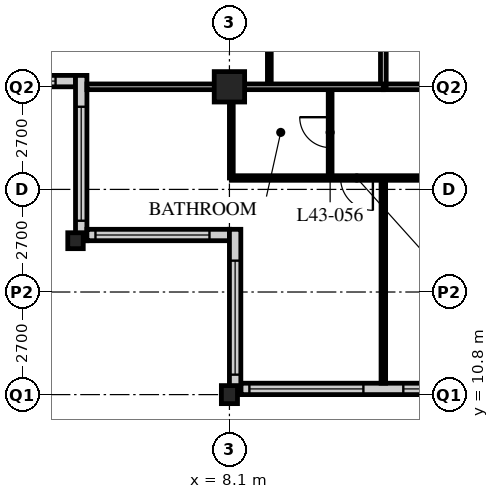
"""IFC4 building model, lengths in metres.
Left out: names, types, materials, properties, quantities, classifications, styles, units other than length and angle.
Written with IfcOpenShell. Run it as: python <this file> out.ifc"""

import sys

from ifc_helpers import new_model, si_unit, direction, frame, frame_2d, origin, origin_2d, place, context, subcontext, project, spatial, rectangle, hollow_rectangle, i_section, extrude, element, fill, save


model = new_model("IFC4")
c1 = context("Model", 3, precision=1e-05, world=origin(), true_north=direction((0.0, 1.0)))
c2 = subcontext(c1, "Body", "Model", "MODEL_VIEW")
j1 = project(units=[si_unit("LENGTHUNIT", "METRE"), si_unit("PLANEANGLEUNIT", "RADIAN")], contexts=[c1])
p1 = place(None, origin())
s1 = spatial("IfcSite", under=j1, at=p1, CompositionType="ELEMENT")
p2 = place(p1, origin())
s2 = spatial("IfcBuilding", under=s1, at=p2, CompositionType="ELEMENT")
p3 = place(p2, frame((0.0, 0.0, 170.4)))
s3 = spatial("IfcBuildingStorey", under=s2, at=p3, CompositionType="ELEMENT", Elevation=170.4)
p4 = place(p3, frame((4.05, 14.85, 0.0), z_axis=(0.0, 0.0, 1.0), x_axis=(1.0, 0.0, 0.0)))
e1 = element("IfcColumn", 1, at=p4, inside=s3, PredefinedType="COLUMN", context=c2, shape_type="SweptSolid", body=[
    extrude(i_section(OverallWidth=0.407, OverallDepth=0.419, WebThickness=0.031, FlangeThickness=0.049, FilletRadius=0.015, at=origin_2d()), origin(), (0.0, 0.0, 1.0), 3.6),
])
p5 = place(p3, frame((8.1, 10.8, 0.0), z_axis=(0.0, 0.0, 1.0), x_axis=(1.0, 0.0, 0.0)))
e2 = element("IfcColumn", 2, at=p5, inside=s3, PredefinedType="COLUMN", context=c2, shape_type="SweptSolid", body=[
    extrude(i_section(OverallWidth=0.424, OverallDepth=0.475, WebThickness=0.048, FlangeThickness=0.077, FilletRadius=0.015, at=origin_2d()), origin(), (0.0, 0.0, 1.0), 3.6),
])
p6 = place(p3, frame((8.1, 18.9, 0.0), z_axis=(0.0, 0.0, 1.0), x_axis=(1.0, 0.0, 0.0)))
e3 = element("IfcColumn", 3, at=p6, inside=s3, PredefinedType="COLUMN", context=c2, shape_type="SweptSolid", body=[
    extrude(hollow_rectangle(XDim=0.8, YDim=0.8, WallThickness=0.08, at=origin_2d()), origin(), (0.0, 0.0, 1.0), 3.6),
])
p7 = place(p3, frame((8.4, 10.95, 0.0), z_axis=(0.0, 0.0, 1.0), x_axis=(1.0, 0.0, 0.0)))
e4 = element("IfcWall", 4, at=p7, inside=s3, PredefinedType="SOLIDWALL", context=c2, shape_type="SweptSolid", body=[
    extrude(rectangle(XDim=40.2, YDim=0.3, at=frame_2d((20.1, 0.0))), origin(), (0.0, 0.0, 1.0), 3.39),
])
p8 = place(p7, frame((0.225, 0.0, 0.6)))
e5 = element("IfcOpeningElement", 5, at=p8, cuts=e4, PredefinedType="OPENING", context=c2, shape_type="SweptSolid", body=[
    extrude(rectangle(XDim=3.0, YDim=2.4, at=frame_2d((1.5, 1.2))), frame((0.0, 0.16, 0.0), z_axis=(0.0, -1.0, 0.0), x_axis=(1.0, 0.0, 0.0)), (0.0, 0.0, 1.0), 0.32),
])
p9 = place(p7, frame((4.275, 0.0, 0.6)))
e6 = element("IfcOpeningElement", 6, at=p9, cuts=e4, PredefinedType="OPENING", context=c2, shape_type="SweptSolid", body=[
    extrude(rectangle(XDim=3.0, YDim=2.4, at=frame_2d((1.5, 1.2))), frame((0.0, 0.16, 0.0), z_axis=(0.0, -1.0, 0.0), x_axis=(1.0, 0.0, 0.0)), (0.0, 0.0, 1.0), 0.32),
])
p10 = place(p7, frame((8.325, 0.0, 0.6)))
e7 = element("IfcOpeningElement", 7, at=p10, cuts=e4, PredefinedType="OPENING", context=c2, shape_type="SweptSolid", body=[
    extrude(rectangle(XDim=3.0, YDim=2.4, at=frame_2d((1.5, 1.2))), frame((0.0, 0.16, 0.0), z_axis=(0.0, -1.0, 0.0), x_axis=(1.0, 0.0, 0.0)), (0.0, 0.0, 1.0), 0.32),
])
p11 = place(p7, frame((12.375, 0.0, 0.6)))
e8 = element("IfcOpeningElement", 8, at=p11, cuts=e4, PredefinedType="OPENING", context=c2, shape_type="SweptSolid", body=[
    extrude(rectangle(XDim=3.0, YDim=2.4, at=frame_2d((1.5, 1.2))), frame((0.0, 0.16, 0.0), z_axis=(0.0, -1.0, 0.0), x_axis=(1.0, 0.0, 0.0)), (0.0, 0.0, 1.0), 0.32),
])
p12 = place(p7, frame((16.425, 0.0, 0.6)))
e9 = element("IfcOpeningElement", 9, at=p12, cuts=e4, PredefinedType="OPENING", context=c2, shape_type="SweptSolid", body=[
    extrude(rectangle(XDim=3.0, YDim=2.4, at=frame_2d((1.5, 1.2))), frame((0.0, 0.16, 0.0), z_axis=(0.0, -1.0, 0.0), x_axis=(1.0, 0.0, 0.0)), (0.0, 0.0, 1.0), 0.32),
])
p13 = place(p7, frame((20.475, 0.0, 0.6)))
e10 = element("IfcOpeningElement", 10, at=p13, cuts=e4, PredefinedType="OPENING", context=c2, shape_type="SweptSolid", body=[
    extrude(rectangle(XDim=3.0, YDim=2.4, at=frame_2d((1.5, 1.2))), frame((0.0, 0.16, 0.0), z_axis=(0.0, -1.0, 0.0), x_axis=(1.0, 0.0, 0.0)), (0.0, 0.0, 1.0), 0.32),
])
p14 = place(p7, frame((24.525, 0.0, 0.6)))
e11 = element("IfcOpeningElement", 11, at=p14, cuts=e4, PredefinedType="OPENING", context=c2, shape_type="SweptSolid", body=[
    extrude(rectangle(XDim=3.0, YDim=2.4, at=frame_2d((1.5, 1.2))), frame((0.0, 0.16, 0.0), z_axis=(0.0, -1.0, 0.0), x_axis=(1.0, 0.0, 0.0)), (0.0, 0.0, 1.0), 0.32),
])
p15 = place(p7, frame((28.575, 0.0, 0.6)))
e12 = element("IfcOpeningElement", 12, at=p15, cuts=e4, PredefinedType="OPENING", context=c2, shape_type="SweptSolid", body=[
    extrude(rectangle(XDim=3.0, YDim=2.4, at=frame_2d((1.5, 1.2))), frame((0.0, 0.16, 0.0), z_axis=(0.0, -1.0, 0.0), x_axis=(1.0, 0.0, 0.0)), (0.0, 0.0, 1.0), 0.32),
])
p16 = place(p7, frame((32.625, 0.0, 0.6)))
e13 = element("IfcOpeningElement", 13, at=p16, cuts=e4, PredefinedType="OPENING", context=c2, shape_type="SweptSolid", body=[
    extrude(rectangle(XDim=3.0, YDim=2.4, at=frame_2d((1.5, 1.2))), frame((0.0, 0.16, 0.0), z_axis=(0.0, -1.0, 0.0), x_axis=(1.0, 0.0, 0.0)), (0.0, 0.0, 1.0), 0.32),
])
p17 = place(p7, frame((36.675, 0.0, 0.6)))
e14 = element("IfcOpeningElement", 14, at=p17, cuts=e4, PredefinedType="OPENING", context=c2, shape_type="SweptSolid", body=[
    extrude(rectangle(XDim=3.0, YDim=2.4, at=frame_2d((1.5, 1.2))), frame((0.0, 0.16, 0.0), z_axis=(0.0, -1.0, 0.0), x_axis=(1.0, 0.0, 0.0)), (0.0, 0.0, 1.0), 0.32),
])
p18 = place(p3, frame((0.3, 19.05, 0.0), z_axis=(0.0, 0.0, 1.0), x_axis=(1.0, 0.0, 0.0)))
e15 = element("IfcWall", 15, at=p18, inside=s3, PredefinedType="SOLIDWALL", context=c2, shape_type="SweptSolid", body=[
    extrude(rectangle(XDim=3.75, YDim=0.3, at=frame_2d((1.875, 0.0))), origin(), (0.0, 0.0, 1.0), 3.39),
])
p19 = place(p18, frame((0.225, 0.0, 0.6)))
e16 = element("IfcOpeningElement", 16, at=p19, cuts=e15, PredefinedType="OPENING", context=c2, shape_type="SweptSolid", body=[
    extrude(rectangle(XDim=3.0, YDim=2.0, at=frame_2d((1.5, 1.0))), frame((0.0, 0.16, 0.0), z_axis=(0.0, -1.0, 0.0), x_axis=(1.0, 0.0, 0.0)), (0.0, 0.0, 1.0), 0.32),
])
p20 = place(p3, frame((4.2, 19.2, 0.0), z_axis=(0.0, 0.0, 1.0), x_axis=(0.0, -1.0, 0.0)))
e17 = element("IfcWall", 17, at=p20, inside=s3, PredefinedType="SOLIDWALL", context=c2, shape_type="SweptSolid", body=[
    extrude(rectangle(XDim=4.35, YDim=0.3, at=frame_2d((2.175, 0.0))), origin(), (0.0, 0.0, 1.0), 3.39),
])
p21 = place(p20, frame((0.825, 0.0, 0.6)))
e18 = element("IfcOpeningElement", 18, at=p21, cuts=e17, PredefinedType="OPENING", context=c2, shape_type="SweptSolid", body=[
    extrude(rectangle(XDim=3.0, YDim=2.0, at=frame_2d((1.5, 1.0))), frame((0.0, 0.16, 0.0), z_axis=(0.0, -1.0, 0.0), x_axis=(1.0, 0.0, 0.0)), (0.0, 0.0, 1.0), 0.32),
])
p22 = place(p3, frame((4.35, 15.0, 0.0), z_axis=(0.0, 0.0, 1.0), x_axis=(1.0, 0.0, 0.0)))
e19 = element("IfcWall", 19, at=p22, inside=s3, PredefinedType="SOLIDWALL", context=c2, shape_type="SweptSolid", body=[
    extrude(rectangle(XDim=3.75, YDim=0.3, at=frame_2d((1.875, 0.0))), origin(), (0.0, 0.0, 1.0), 3.39),
])
p23 = place(p22, frame((0.225, 0.0, 0.6)))
e20 = element("IfcOpeningElement", 20, at=p23, cuts=e19, PredefinedType="OPENING", context=c2, shape_type="SweptSolid", body=[
    extrude(rectangle(XDim=3.0, YDim=2.0, at=frame_2d((1.5, 1.0))), frame((0.0, 0.16, 0.0), z_axis=(0.0, -1.0, 0.0), x_axis=(1.0, 0.0, 0.0)), (0.0, 0.0, 1.0), 0.32),
])
p24 = place(p3, frame((8.25, 15.15, 0.0), z_axis=(0.0, 0.0, 1.0), x_axis=(0.0, -1.0, 0.0)))
e21 = element("IfcWall", 21, at=p24, inside=s3, PredefinedType="SOLIDWALL", context=c2, shape_type="SweptSolid", body=[
    extrude(rectangle(XDim=4.35, YDim=0.3, at=frame_2d((2.175, 0.0))), origin(), (0.0, 0.0, 1.0), 3.39),
])
p25 = place(p24, frame((0.825, 0.0, 0.6)))
e22 = element("IfcOpeningElement", 22, at=p25, cuts=e21, PredefinedType="OPENING", context=c2, shape_type="SweptSolid", body=[
    extrude(rectangle(XDim=3.0, YDim=2.0, at=frame_2d((1.5, 1.0))), frame((0.0, 0.16, 0.0), z_axis=(0.0, -1.0, 0.0), x_axis=(1.0, 0.0, 0.0)), (0.0, 0.0, 1.0), 0.32),
])
p26 = place(p3, frame((12.15, 18.9, 0.0), z_axis=(0.0, 0.0, 1.0), x_axis=(1.0, 0.0, 0.0)))
e23 = element("IfcWall", 23, at=p26, inside=s3, PredefinedType="PARTITIONING", context=c2, shape_type="SweptSolid", body=[
    extrude(rectangle(XDim=32.4, YDim=0.15, at=frame_2d((16.2, 0.0))), origin(), (0.0, 0.0, 1.0), 2.778),
])
p27 = place(p26, frame((6.4, 0.0, 0.0)))
e24 = element("IfcOpeningElement", 24, at=p27, cuts=e23, PredefinedType="OPENING", context=c2, shape_type="SweptSolid", body=[
    extrude(rectangle(XDim=1.0, YDim=2.1, at=frame_2d((0.5, 1.05))), frame((0.0, 0.085, 0.0), z_axis=(0.0, -1.0, 0.0), x_axis=(1.0, 0.0, 0.0)), (0.0, 0.0, 1.0), 0.17),
])
p28 = place(p26, frame((8.8, 0.0, 0.0)))
e25 = element("IfcOpeningElement", 25, at=p28, cuts=e23, PredefinedType="OPENING", context=c2, shape_type="SweptSolid", body=[
    extrude(rectangle(XDim=1.0, YDim=2.1, at=frame_2d((0.5, 1.05))), frame((0.0, 0.085, 0.0), z_axis=(0.0, -1.0, 0.0), x_axis=(1.0, 0.0, 0.0)), (0.0, 0.0, 1.0), 0.17),
])
p29 = place(p26, frame((13.05, 0.0, 0.0)))
e26 = element("IfcOpeningElement", 26, at=p29, cuts=e23, PredefinedType="OPENING", context=c2, shape_type="SweptSolid", body=[
    extrude(rectangle(XDim=1.0, YDim=2.1, at=frame_2d((0.5, 1.05))), frame((0.0, 0.085, 0.0), z_axis=(0.0, -1.0, 0.0), x_axis=(1.0, 0.0, 0.0)), (0.0, 0.0, 1.0), 0.17),
])
p30 = place(p26, frame((22.6, 0.0, 0.0)))
e27 = element("IfcOpeningElement", 27, at=p30, cuts=e23, PredefinedType="OPENING", context=c2, shape_type="SweptSolid", body=[
    extrude(rectangle(XDim=1.0, YDim=2.1, at=frame_2d((0.5, 1.05))), frame((0.0, 0.085, 0.0), z_axis=(0.0, -1.0, 0.0), x_axis=(1.0, 0.0, 0.0)), (0.0, 0.0, 1.0), 0.17),
])
p31 = place(p26, frame((25.0, 0.0, 0.0)))
e28 = element("IfcOpeningElement", 28, at=p31, cuts=e23, PredefinedType="OPENING", context=c2, shape_type="SweptSolid", body=[
    extrude(rectangle(XDim=1.0, YDim=2.1, at=frame_2d((0.5, 1.05))), frame((0.0, 0.085, 0.0), z_axis=(0.0, -1.0, 0.0), x_axis=(1.0, 0.0, 0.0)), (0.0, 0.0, 1.0), 0.17),
])
p32 = place(p26, frame((1.525, 0.0, 0.0)))
e29 = element("IfcOpeningElement", 29, at=p32, cuts=e23, PredefinedType="OPENING", context=c2, shape_type="SweptSolid", body=[
    extrude(rectangle(XDim=1.0, YDim=2.1, at=frame_2d((0.5, 1.05))), frame((0.0, 0.085, 0.0), z_axis=(0.0, -1.0, 0.0), x_axis=(1.0, 0.0, 0.0)), (0.0, 0.0, 1.0), 0.17),
])
p33 = place(p26, frame((29.875, 0.0, 0.0)))
e30 = element("IfcOpeningElement", 30, at=p33, cuts=e23, PredefinedType="OPENING", context=c2, shape_type="SweptSolid", body=[
    extrude(rectangle(XDim=1.0, YDim=2.1, at=frame_2d((0.5, 1.05))), frame((0.0, 0.085, 0.0), z_axis=(0.0, -1.0, 0.0), x_axis=(1.0, 0.0, 0.0)), (0.0, 0.0, 1.0), 0.17),
])
p34 = place(p3, frame((12.15, 18.9, 0.0), z_axis=(0.0, 0.0, 1.0), x_axis=(0.0, 1.0, 0.0)))
e31 = element("IfcWall", 31, at=p34, inside=s3, PredefinedType="PARTITIONING", context=c2, shape_type="SweptSolid", body=[
    extrude(rectangle(XDim=24.3, YDim=0.15, at=frame_2d((12.15, 0.0))), origin(), (0.0, 0.0, 1.0), 3.39),
])
p35 = place(p34, frame((2.35, 0.0, 0.0)))
e32 = element("IfcOpeningElement", 32, at=p35, cuts=e31, PredefinedType="OPENING", context=c2, shape_type="SweptSolid", body=[
    extrude(rectangle(XDim=1.0, YDim=2.1, at=frame_2d((0.5, 1.05))), frame((0.0, 0.085, 0.0), z_axis=(0.0, -1.0, 0.0), x_axis=(1.0, 0.0, 0.0)), (0.0, 0.0, 1.0), 0.17),
])
p36 = place(p34, frame((6.4, 0.0, 0.0)))
e33 = element("IfcOpeningElement", 33, at=p36, cuts=e31, PredefinedType="OPENING", context=c2, shape_type="SweptSolid", body=[
    extrude(rectangle(XDim=1.0, YDim=2.1, at=frame_2d((0.5, 1.05))), frame((0.0, 0.085, 0.0), z_axis=(0.0, -1.0, 0.0), x_axis=(1.0, 0.0, 0.0)), (0.0, 0.0, 1.0), 0.17),
])
p37 = place(p34, frame((8.5, 0.0, 0.0)))
e34 = element("IfcOpeningElement", 34, at=p37, cuts=e31, PredefinedType="OPENING", context=c2, shape_type="SweptSolid", body=[
    extrude(rectangle(XDim=1.0, YDim=2.1, at=frame_2d((0.5, 1.05))), frame((0.0, 0.085, 0.0), z_axis=(0.0, -1.0, 0.0), x_axis=(1.0, 0.0, 0.0)), (0.0, 0.0, 1.0), 0.17),
])
p38 = place(p34, frame((16.6, 0.0, 0.0)))
e35 = element("IfcOpeningElement", 35, at=p38, cuts=e31, PredefinedType="OPENING", context=c2, shape_type="SweptSolid", body=[
    extrude(rectangle(XDim=1.0, YDim=2.1, at=frame_2d((0.5, 1.05))), frame((0.0, 0.085, 0.0), z_axis=(0.0, -1.0, 0.0), x_axis=(1.0, 0.0, 0.0)), (0.0, 0.0, 1.0), 0.17),
])
p39 = place(p3, frame((9.15, 18.9, 0.0), z_axis=(0.0, 0.0, 1.0), x_axis=(0.0, 1.0, 0.0)))
e36 = element("IfcWall", 36, at=p39, inside=s3, PredefinedType="PARTITIONING", context=c2, shape_type="SweptSolid", body=[
    extrude(rectangle(XDim=2.2, YDim=0.1, at=frame_2d((1.1, 0.0))), origin(), (0.0, 0.0, 1.0), 3.39),
])
p40 = place(p3, frame((10.75, 18.9, 0.0), z_axis=(0.0, 0.0, 1.0), x_axis=(0.0, -1.0, 0.0)))
e37 = element("IfcWall", 37, at=p40, inside=s3, PredefinedType="PARTITIONING", context=c2, shape_type="SweptSolid", body=[
    extrude(rectangle(XDim=2.4, YDim=0.1, at=frame_2d((1.2, 0.0))), origin(), (0.0, 0.0, 1.0), 3.39),
])
p41 = place(p40, frame((0.8, 0.0, 0.0)))
e38 = element("IfcOpeningElement", 38, at=p41, cuts=e37, PredefinedType="OPENING", context=c2, shape_type="SweptSolid", body=[
    extrude(rectangle(XDim=0.8, YDim=2.1, at=frame_2d((0.4, 1.05))), frame((0.0, 0.06, 0.0), z_axis=(0.0, -1.0, 0.0), x_axis=(1.0, 0.0, 0.0)), (0.0, 0.0, 1.0), 0.12),
])
p42 = place(p3, frame((8.15, 18.9, 0.0), z_axis=(0.0, 0.0, 1.0), x_axis=(0.0, -1.0, 0.0)))
e39 = element("IfcWall", 39, at=p42, inside=s3, PredefinedType="PARTITIONING", context=c2, shape_type="SweptSolid", body=[
    extrude(rectangle(XDim=2.4, YDim=0.1, at=frame_2d((1.2, 0.0))), origin(), (0.0, 0.0, 1.0), 2.778),
])
p43 = place(p3, frame((8.15, 16.5, 0.0), z_axis=(0.0, 0.0, 1.0), x_axis=(1.0, 0.0, 0.0)))
e40 = element("IfcWall", 40, at=p43, inside=s3, PredefinedType="PARTITIONING", context=c2, shape_type="SweptSolid", body=[
    extrude(rectangle(XDim=8.05, YDim=0.12, at=frame_2d((4.025, 0.0))), origin(), (0.0, 0.0, 1.0), 3.39),
])
p44 = place(p43, frame((6.725, 0.0, 0.0)))
e41 = element("IfcOpeningElement", 41, at=p44, cuts=e40, PredefinedType="OPENING", context=c2, shape_type="SweptSolid", body=[
    extrude(rectangle(XDim=0.85, YDim=2.1, at=frame_2d((0.425, 1.05))), frame((0.0, 0.07, 0.0), z_axis=(0.0, -1.0, 0.0), x_axis=(1.0, 0.0, 0.0)), (0.0, 0.0, 1.0), 0.14),
])
p45 = place(p43, frame((2.875, 0.0, 0.0)))
e42 = element("IfcOpeningElement", 42, at=p45, cuts=e40, PredefinedType="OPENING", context=c2, shape_type="SweptSolid", body=[
    extrude(rectangle(XDim=0.85, YDim=2.1, at=frame_2d((0.425, 1.05))), frame((0.0, 0.07, 0.0), z_axis=(0.0, -1.0, 0.0), x_axis=(1.0, 0.0, 0.0)), (0.0, 0.0, 1.0), 0.14),
])
p46 = place(p3, frame((12.15, 16.5, 0.0), z_axis=(0.0, 0.0, 1.0), x_axis=(0.0, -1.0, 0.0)))
e43 = element("IfcWall", 43, at=p46, inside=s3, PredefinedType="PARTITIONING", context=c2, shape_type="SweptSolid", body=[
    extrude(rectangle(XDim=5.4, YDim=0.12, at=frame_2d((2.7, 0.0))), origin(), (0.0, 0.0, 1.0), 3.39),
])
p47 = place(p3, frame((4.35, 18.9, 0.0), z_axis=(0.0, 0.0, 1.0), x_axis=(1.0, 0.0, 0.0)))
e44 = element("IfcWall", 44, at=p47, inside=s3, PredefinedType="PARTITIONING", context=c2, shape_type="SweptSolid", body=[
    extrude(rectangle(XDim=7.8, YDim=0.15, at=frame_2d((3.9, 0.0))), origin(), (0.0, 0.0, 1.0), 2.778),
])
p48 = place(p8, origin())
e45 = element("IfcWindow", 45, at=p48, inside=s3, PartitioningType="SINGLE_PANEL", PredefinedType="WINDOW", context=c2, shape_type="SweptSolid", body=[
    extrude(rectangle(XDim=3.0, YDim=2.4, at=frame_2d((1.5, 1.2))), frame((0.0, 0.03, 0.0), z_axis=(0.0, -1.0, 0.0), x_axis=(1.0, 0.0, 0.0)), (0.0, 0.0, 1.0), 0.06),
])
fill(e5, e45)
p49 = place(p9, origin())
e46 = element("IfcWindow", 46, at=p49, inside=s3, PartitioningType="SINGLE_PANEL", PredefinedType="WINDOW", context=c2, shape_type="SweptSolid", body=[
    extrude(rectangle(XDim=3.0, YDim=2.4, at=frame_2d((1.5, 1.2))), frame((0.0, 0.03, 0.0), z_axis=(0.0, -1.0, 0.0), x_axis=(1.0, 0.0, 0.0)), (0.0, 0.0, 1.0), 0.06),
])
fill(e6, e46)
p50 = place(p19, origin())
e47 = element("IfcWindow", 47, at=p50, inside=s3, PartitioningType="SINGLE_PANEL", PredefinedType="WINDOW", context=c2, shape_type="SweptSolid", body=[
    extrude(rectangle(XDim=3.0, YDim=2.0, at=frame_2d((1.5, 1.0))), frame((0.0, 0.03, 0.0), z_axis=(0.0, -1.0, 0.0), x_axis=(1.0, 0.0, 0.0)), (0.0, 0.0, 1.0), 0.06),
])
fill(e16, e47)
p51 = place(p21, origin())
e48 = element("IfcWindow", 48, at=p51, inside=s3, PartitioningType="SINGLE_PANEL", PredefinedType="WINDOW", context=c2, shape_type="SweptSolid", body=[
    extrude(rectangle(XDim=3.0, YDim=2.0, at=frame_2d((1.5, 1.0))), frame((0.0, 0.03, 0.0), z_axis=(0.0, -1.0, 0.0), x_axis=(1.0, 0.0, 0.0)), (0.0, 0.0, 1.0), 0.06),
])
fill(e18, e48)
p52 = place(p23, origin())
e49 = element("IfcWindow", 49, at=p52, inside=s3, PartitioningType="SINGLE_PANEL", PredefinedType="WINDOW", context=c2, shape_type="SweptSolid", body=[
    extrude(rectangle(XDim=3.0, YDim=2.0, at=frame_2d((1.5, 1.0))), frame((0.0, 0.03, 0.0), z_axis=(0.0, -1.0, 0.0), x_axis=(1.0, 0.0, 0.0)), (0.0, 0.0, 1.0), 0.06),
])
fill(e20, e49)
p53 = place(p25, origin())
e50 = element("IfcWindow", 50, at=p53, inside=s3, PartitioningType="SINGLE_PANEL", PredefinedType="WINDOW", context=c2, shape_type="SweptSolid", body=[
    extrude(rectangle(XDim=3.0, YDim=2.0, at=frame_2d((1.5, 1.0))), frame((0.0, 0.03, 0.0), z_axis=(0.0, -1.0, 0.0), x_axis=(1.0, 0.0, 0.0)), (0.0, 0.0, 1.0), 0.06),
])
fill(e22, e50)
p54 = place(p41, origin())
e51 = element("IfcDoor", 51, at=p54, inside=s3, OperationType="SINGLE_SWING_RIGHT", PredefinedType="DOOR", context=c2, shape_type="SweptSolid", body=[
    extrude(rectangle(XDim=0.8, YDim=2.1, at=frame_2d((0.4, 1.05))), frame((0.0, 0.025, 0.0), z_axis=(0.0, -1.0, 0.0), x_axis=(1.0, 0.0, 0.0)), (0.0, 0.0, 1.0), 0.05),
])
fill(e38, e51)
p55 = place(p45, origin())
e52 = element("IfcDoor", 52, at=p55, inside=s3, OperationType="SINGLE_SWING_LEFT", PredefinedType="DOOR", context=c2, shape_type="SweptSolid", body=[
    extrude(rectangle(XDim=0.85, YDim=2.1, at=frame_2d((0.425, 1.05))), frame((0.0, 0.025, 0.0), z_axis=(0.0, -1.0, 0.0), x_axis=(1.0, 0.0, 0.0)), (0.0, 0.0, 1.0), 0.05),
])
fill(e42, e52)
save(model, sys.argv[1])
